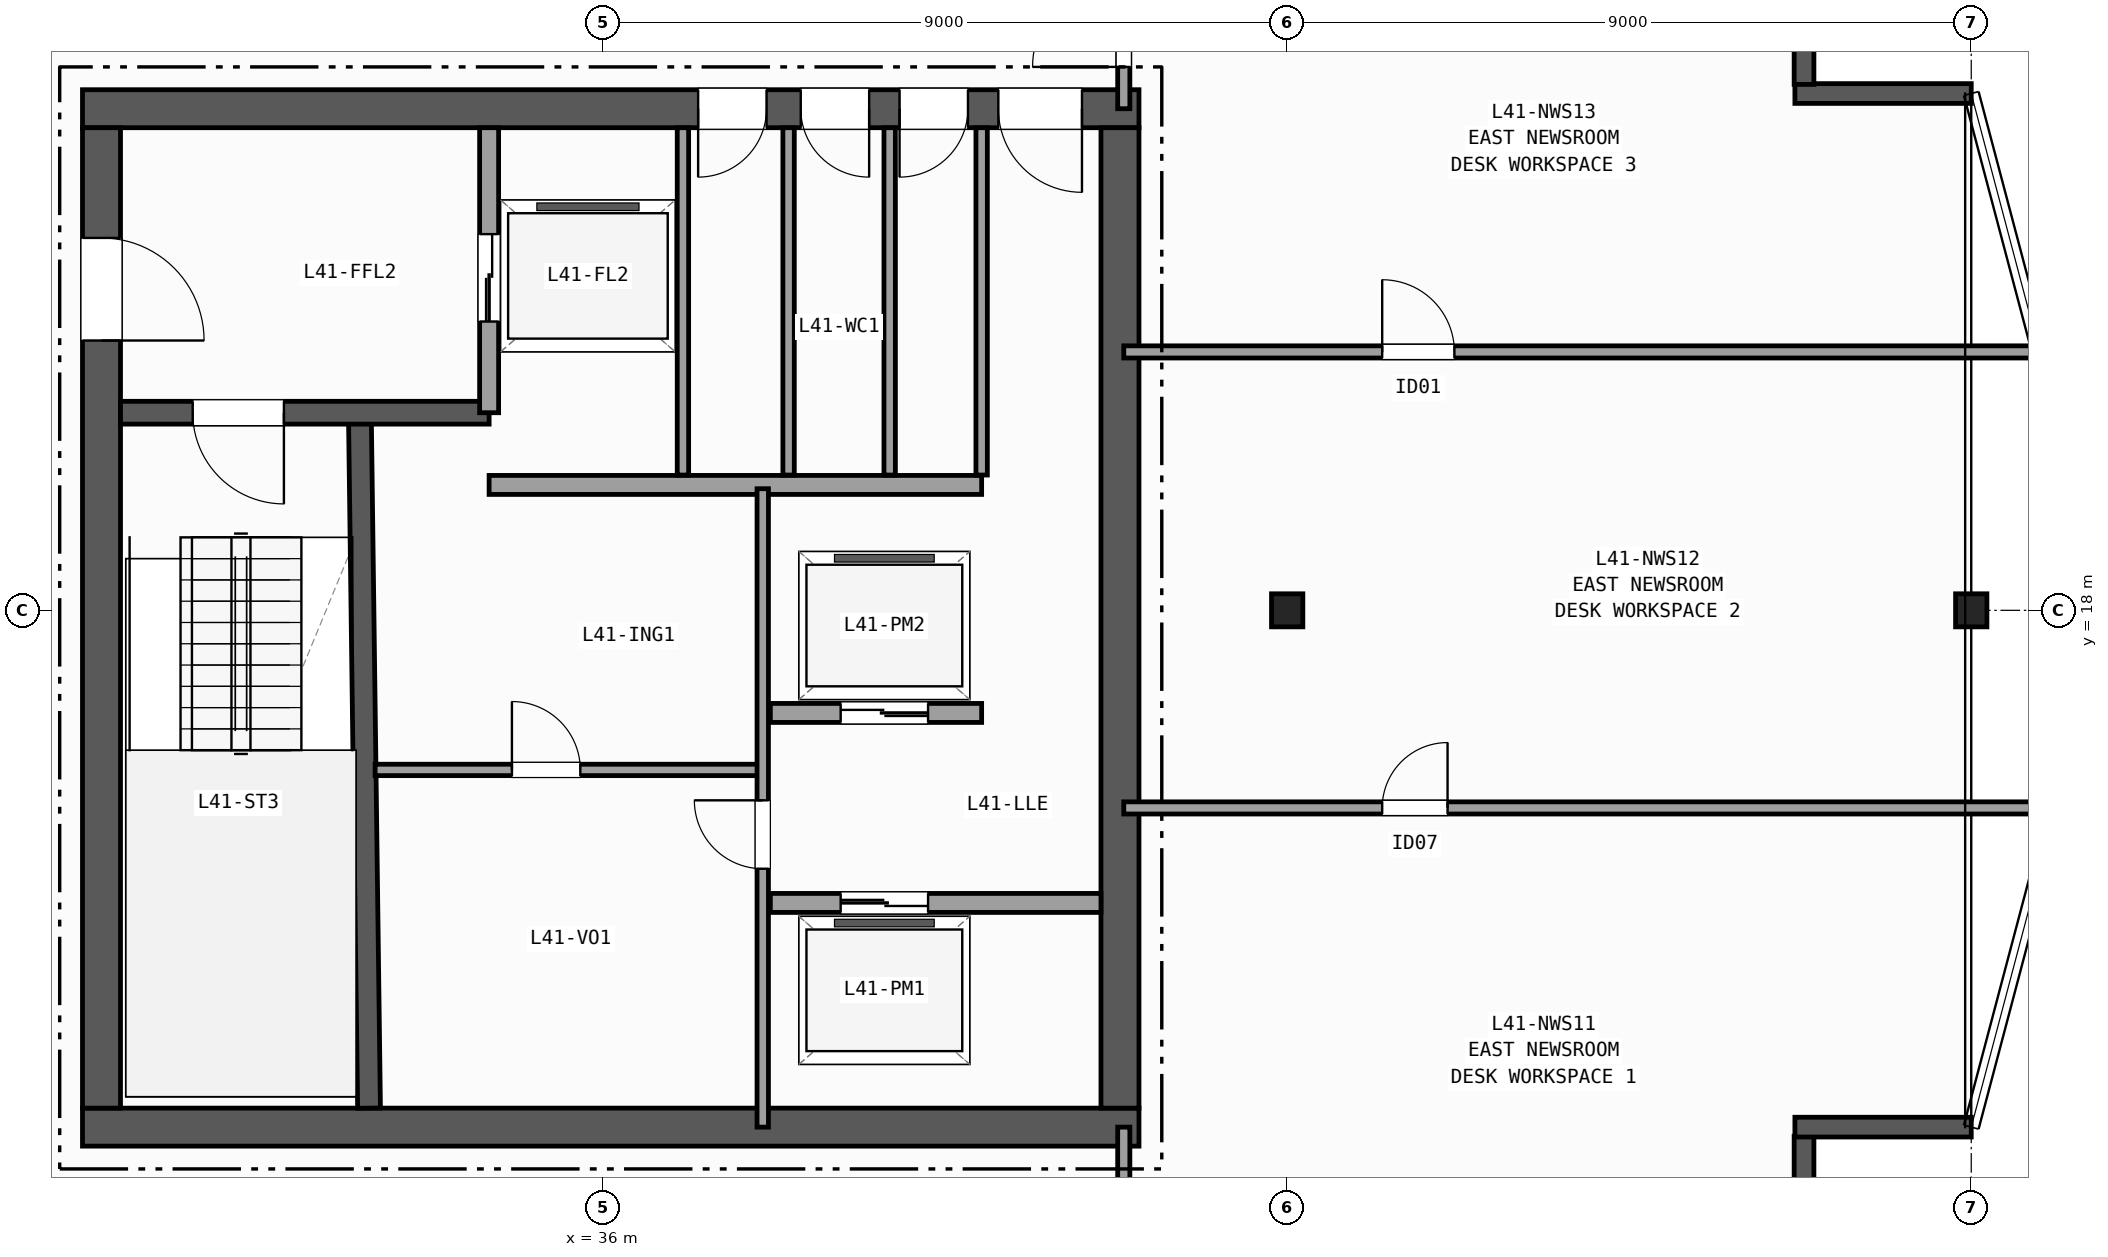
"""IFC4 building model, lengths in metres.
Left out: names, types, materials, properties, quantities, classifications, styles, units other than length and angle.
Written with IfcOpenShell. Run it as: python <this file> out.ifc"""

import sys

from ifc_helpers import new_model, si_unit, direction, frame, frame_2d, origin, origin_2d, place, context, subcontext, project, spatial, rectangle, i_section, extrude, element, fill, save


model = new_model("IFC4")
c1 = context("Model", 3, precision=1e-05, world=origin(), true_north=direction((0.0, 1.0)))
c2 = subcontext(c1, "Body", "Model", "MODEL_VIEW")
j1 = project(units=[si_unit("LENGTHUNIT", "METRE"), si_unit("PLANEANGLEUNIT", "RADIAN")], contexts=[c1])
p1 = place(None, origin())
s1 = spatial("IfcSite", under=j1, at=p1, CompositionType="ELEMENT")
p2 = place(p1, origin())
s2 = spatial("IfcBuilding", under=s1, at=p2, CompositionType="ELEMENT")
p3 = place(p2, frame((0.0, 0.0, 165.5)))
s3 = spatial("IfcBuildingStorey", under=s2, at=p3, CompositionType="ELEMENT", Elevation=165.5)
for number, where, z_axis, x_axis in (
    (1, (45.0, 18.0, 0.0), (0.0, 0.0, 1.0), (1.0, 0.0, 0.0)),
    (2, (54.0, 18.0, 0.0), (0.0, 0.0, 1.0), (1.0, 0.0, 0.0)),
):
    element("IfcColumn", number, at=place(p3, frame(where, z_axis=z_axis, x_axis=x_axis)), inside=s3, PredefinedType="COLUMN", context=c2, shape_type="SweptSolid", body=[
        extrude(i_section(OverallWidth=0.412, OverallDepth=0.435, WebThickness=0.036, FlangeThickness=0.057, FilletRadius=0.015, at=origin_2d()), origin(), (0.0, 0.0, 1.0), 3.7),
    ])
p4 = place(p3, frame((51.8, 9.0, 0.0), z_axis=(0.0, 0.0, 1.0), x_axis=(0.0, 1.0, 0.0)))
e3 = element("IfcWall", 3, at=p4, inside=s3, PredefinedType="SOLIDWALL", context=c2, shape_type="SweptSolid", body=[
    extrude(rectangle(XDim=2.08, YDim=0.26, at=frame_2d((1.04, 0.0))), origin(), (0.0, 0.0, 1.0), 3.37),
])
for number, where, z_axis, x_axis in (
    (4, (51.68, 11.2, 0.0), (0.0, 0.0, 1.0), (1.0, 0.0, 0.0)),
    (5, (54.0, 24.8, 0.0), (0.0, 0.0, 1.0), (-1.0, 0.0, 0.0)),
):
    element("IfcWall", number, at=place(p3, frame(where, z_axis=z_axis, x_axis=x_axis)), inside=s3, PredefinedType="SOLIDWALL", context=c2, shape_type="SweptSolid", body=[
        extrude(rectangle(XDim=2.32, YDim=0.26, at=frame_2d((1.16, 0.0))), origin(), (0.0, 0.0, 1.0), 3.37),
    ])
p5 = place(p3, frame((51.8, 24.92, 0.0), z_axis=(0.0, 0.0, 1.0), x_axis=(0.0, 1.0, 0.0)))
e6 = element("IfcWall", 6, at=p5, inside=s3, PredefinedType="SOLIDWALL", context=c2, shape_type="SweptSolid", body=[
    extrude(rectangle(XDim=2.08, YDim=0.26, at=frame_2d((1.04, 0.0))), origin(), (0.0, 0.0, 1.0), 3.37),
])
p6 = place(p3, frame((29.15, 11.2, 0.0), z_axis=(0.0, 0.0, 1.0), x_axis=(1.0, 0.0, 0.0)))
e7 = element("IfcWall", 7, at=p6, inside=s3, PredefinedType="SHEAR", context=c2, shape_type="SweptSolid", body=[
    extrude(rectangle(XDim=13.9, YDim=0.5, at=frame_2d((6.95, 0.0))), origin(), (0.0, 0.0, 1.0), 3.37),
])
p7 = place(p3, frame((43.05, 24.6, 0.0), z_axis=(0.0, 0.0, 1.0), x_axis=(-1.0, 0.0, 0.0)))
e8 = element("IfcWall", 8, at=p7, inside=s3, PredefinedType="SHEAR", context=c2, shape_type="SweptSolid", body=[
    extrude(rectangle(XDim=13.9, YDim=0.5, at=frame_2d((6.95, 0.0))), origin(), (0.0, 0.0, 1.0), 3.37),
])
p8 = place(p7, frame((0.75, 0.0, 0.0)))
e9 = element("IfcOpeningElement", 9, at=p8, cuts=e8, PredefinedType="OPENING", context=c2, shape_type="SweptSolid", body=[
    extrude(rectangle(XDim=1.1, YDim=2.15, at=frame_2d((0.55, 1.075))), frame((0.0, 0.26, 0.0), z_axis=(0.0, -1.0, 0.0), x_axis=(1.0, 0.0, 0.0)), (0.0, 0.0, 1.0), 0.52),
])
p9 = place(p7, frame((2.25, 0.0, 0.0)))
e10 = element("IfcOpeningElement", 10, at=p9, cuts=e8, PredefinedType="OPENING", context=c2, shape_type="SweptSolid", body=[
    extrude(rectangle(XDim=0.9, YDim=2.1, at=frame_2d((0.45, 1.05))), frame((0.0, 0.26, 0.0), z_axis=(0.0, -1.0, 0.0), x_axis=(1.0, 0.0, 0.0)), (0.0, 0.0, 1.0), 0.52),
])
p10 = place(p7, frame((3.55, 0.0, 0.0)))
e11 = element("IfcOpeningElement", 11, at=p10, cuts=e8, PredefinedType="OPENING", context=c2, shape_type="SweptSolid", body=[
    extrude(rectangle(XDim=0.9, YDim=2.1, at=frame_2d((0.45, 1.05))), frame((0.0, 0.26, 0.0), z_axis=(0.0, -1.0, 0.0), x_axis=(1.0, 0.0, 0.0)), (0.0, 0.0, 1.0), 0.52),
])
p11 = place(p7, frame((4.9, 0.0, 0.0)))
e12 = element("IfcOpeningElement", 12, at=p11, cuts=e8, PredefinedType="OPENING", context=c2, shape_type="SweptSolid", body=[
    extrude(rectangle(XDim=0.9, YDim=2.1, at=frame_2d((0.45, 1.05))), frame((0.0, 0.26, 0.0), z_axis=(0.0, -1.0, 0.0), x_axis=(1.0, 0.0, 0.0)), (0.0, 0.0, 1.0), 0.52),
])
p12 = place(p3, frame((29.4, 24.35, 0.0), z_axis=(0.0, 0.0, 1.0), x_axis=(0.0, -1.0, 0.0)))
e13 = element("IfcWall", 13, at=p12, inside=s3, PredefinedType="SHEAR", context=c2, shape_type="SweptSolid", body=[
    extrude(rectangle(XDim=12.9, YDim=0.5, at=frame_2d((6.45, 0.0))), origin(), (0.0, 0.0, 1.0), 3.37),
])
p13 = place(p12, frame((1.45, 0.0, 0.0)))
e14 = element("IfcOpeningElement", 14, at=p13, cuts=e13, PredefinedType="OPENING", context=c2, shape_type="SweptSolid", body=[
    extrude(rectangle(XDim=1.35, YDim=2.15, at=frame_2d((0.675, 1.075))), frame((0.0, 0.26, 0.0), z_axis=(0.0, -1.0, 0.0), x_axis=(1.0, 0.0, 0.0)), (0.0, 0.0, 1.0), 0.52),
])
p14 = place(p3, frame((42.8, 11.45, 0.0), z_axis=(0.0, 0.0, 1.0), x_axis=(0.0, 1.0, 0.0)))
e15 = element("IfcWall", 15, at=p14, inside=s3, PredefinedType="SHEAR", context=c2, shape_type="SweptSolid", body=[
    extrude(rectangle(XDim=12.9, YDim=0.5, at=frame_2d((6.45, 0.0))), origin(), (0.0, 0.0, 1.0), 3.37),
])
p15 = place(p3, frame((32.92, 11.45, 0.0), z_axis=(0.0, 0.0, 1.0), x_axis=(-0.013171578211, 0.999913251001, 0.0)))
e16 = element("IfcWall", 16, at=p15, inside=s3, PredefinedType="SHEAR", context=c2, shape_type="SweptSolid", body=[
    extrude(rectangle(XDim=9.101, YDim=0.3, at=frame_2d((4.55, 0.0))), origin(), (0.0, 0.0, 1.0), 3.37),
])
p16 = place(p3, frame((34.5, 20.6, 0.0), z_axis=(0.0, 0.0, 1.0), x_axis=(-1.0, 0.0, 0.0)))
e17 = element("IfcWall", 17, at=p16, inside=s3, PredefinedType="SHEAR", context=c2, shape_type="SweptSolid", body=[
    extrude(rectangle(XDim=4.85, YDim=0.3, at=frame_2d((2.425, 0.0))), origin(), (0.0, 0.0, 1.0), 3.37),
])
p17 = place(p16, frame((2.7, 0.0, 0.0)))
e18 = element("IfcOpeningElement", 18, at=p17, cuts=e17, PredefinedType="OPENING", context=c2, shape_type="SweptSolid", body=[
    extrude(rectangle(XDim=1.2, YDim=2.15, at=frame_2d((0.6, 1.075))), frame((0.0, 0.16, 0.0), z_axis=(0.0, -1.0, 0.0), x_axis=(1.0, 0.0, 0.0)), (0.0, 0.0, 1.0), 0.32),
])
p18 = place(p3, frame((34.5, 20.6, 0.0), z_axis=(0.0, 0.0, 1.0), x_axis=(0.0, 1.0, 0.0)))
e19 = element("IfcWall", 19, at=p18, inside=s3, PredefinedType="PARTITIONING", context=c2, shape_type="SweptSolid", body=[
    extrude(rectangle(XDim=3.75, YDim=0.25, at=frame_2d((1.875, 0.0))), origin(), (0.0, 0.0, 1.0), 3.37),
])
p19 = place(p18, frame((1.2, 0.0, 0.0)))
e20 = element("IfcOpeningElement", 20, at=p19, cuts=e19, PredefinedType="OPENING", context=c2, shape_type="SweptSolid", body=[
    extrude(rectangle(XDim=1.15, YDim=2.15, at=frame_2d((0.575, 1.075))), frame((0.0, 0.135, 0.0), z_axis=(0.0, -1.0, 0.0), x_axis=(1.0, 0.0, 0.0)), (0.0, 0.0, 1.0), 0.27),
])
p20 = place(p3, frame((34.5, 19.65, 0.0), z_axis=(0.0, 0.0, 1.0), x_axis=(1.0, 0.0, 0.0)))
e21 = element("IfcWall", 21, at=p20, inside=s3, PredefinedType="PARTITIONING", context=c2, shape_type="SweptSolid", body=[
    extrude(rectangle(XDim=6.48, YDim=0.25, at=frame_2d((3.24, 0.0))), origin(), (0.0, 0.0, 1.0), 3.37),
])
p21 = place(p3, frame((38.2, 14.15, 0.0), z_axis=(0.0, 0.0, 1.0), x_axis=(1.0, 0.0, 0.0)))
e22 = element("IfcWall", 22, at=p21, inside=s3, PredefinedType="PARTITIONING", context=c2, shape_type="SweptSolid", body=[
    extrude(rectangle(XDim=4.35, YDim=0.25, at=frame_2d((2.175, 0.0))), origin(), (0.0, 0.0, 1.0), 3.37),
])
p22 = place(p21, frame((0.925, 0.0, 0.0)))
e23 = element("IfcOpeningElement", 23, at=p22, cuts=e22, PredefinedType="OPENING", context=c2, shape_type="SweptSolid", body=[
    extrude(rectangle(XDim=1.15, YDim=2.15, at=frame_2d((0.575, 1.075))), frame((0.0, 0.135, 0.0), z_axis=(0.0, -1.0, 0.0), x_axis=(1.0, 0.0, 0.0)), (0.0, 0.0, 1.0), 0.27),
])
p23 = place(p3, frame((40.98, 16.65, 0.0), z_axis=(0.0, 0.0, 1.0), x_axis=(-1.0, 0.0, 0.0)))
e24 = element("IfcWall", 24, at=p23, inside=s3, PredefinedType="PARTITIONING", context=c2, shape_type="SweptSolid", body=[
    extrude(rectangle(XDim=2.78, YDim=0.25, at=frame_2d((1.39, 0.0))), origin(), (0.0, 0.0, 1.0), 3.37),
])
p24 = place(p23, frame((0.705, 0.0, 0.0)))
e25 = element("IfcOpeningElement", 25, at=p24, cuts=e24, PredefinedType="OPENING", context=c2, shape_type="SweptSolid", body=[
    extrude(rectangle(XDim=1.15, YDim=2.15, at=frame_2d((0.575, 1.075))), frame((0.0, 0.135, 0.0), z_axis=(0.0, -1.0, 0.0), x_axis=(1.0, 0.0, 0.0)), (0.0, 0.0, 1.0), 0.27),
])
p25 = place(p3, frame((33.0, 15.9, 0.0), z_axis=(0.0, 0.0, 1.0), x_axis=(1.0, 0.0, 0.0)))
e26 = element("IfcWall", 26, at=p25, inside=s3, PredefinedType="PARTITIONING", context=c2, shape_type="SweptSolid", body=[
    extrude(rectangle(XDim=5.1, YDim=0.15, at=frame_2d((2.55, 0.0))), origin(), (0.0, 0.0, 1.0), 3.37),
])
p26 = place(p25, frame((1.8, 0.0, 0.0)))
e27 = element("IfcOpeningElement", 27, at=p26, cuts=e26, PredefinedType="OPENING", context=c2, shape_type="SweptSolid", body=[
    extrude(rectangle(XDim=0.9, YDim=2.1, at=frame_2d((0.45, 1.05))), frame((0.0, 0.085, 0.0), z_axis=(0.0, -1.0, 0.0), x_axis=(1.0, 0.0, 0.0)), (0.0, 0.0, 1.0), 0.17),
])
p27 = place(p3, frame((38.1, 11.2, 0.0), z_axis=(0.0, 0.0, 1.0), x_axis=(0.0, 1.0, 0.0)))
e28 = element("IfcWall", 28, at=p27, inside=s3, PredefinedType="PARTITIONING", context=c2, shape_type="SweptSolid", body=[
    extrude(rectangle(XDim=8.4, YDim=0.15, at=frame_2d((4.2, 0.0))), origin(), (0.0, 0.0, 1.0), 3.37),
])
p28 = place(p27, frame((3.4, 0.0, 0.0)))
e29 = element("IfcOpeningElement", 29, at=p28, cuts=e28, PredefinedType="OPENING", context=c2, shape_type="SweptSolid", body=[
    extrude(rectangle(XDim=0.9, YDim=2.1, at=frame_2d((0.45, 1.05))), frame((0.0, 0.085, 0.0), z_axis=(0.0, -1.0, 0.0), x_axis=(1.0, 0.0, 0.0)), (0.0, 0.0, 1.0), 0.17),
])
for number, where, z_axis, x_axis in (
    (30, (37.05, 19.78, 0.0), (0.0, 0.0, 1.0), (0.0, 1.0, 0.0)),
    (31, (38.44, 19.78, 0.0), (0.0, 0.0, 1.0), (0.0, 1.0, 0.0)),
    (32, (39.77, 19.78, 0.0), (0.0, 0.0, 1.0), (0.0, 1.0, 0.0)),
    (33, (40.98, 19.78, 0.0), (0.0, 0.0, 1.0), (0.0, 1.0, 0.0)),
):
    element("IfcWall", number, at=place(p3, frame(where, z_axis=z_axis, x_axis=x_axis)), inside=s3, PredefinedType="PARTITIONING", context=c2, shape_type="SweptSolid", body=[
        extrude(rectangle(XDim=4.57, YDim=0.15, at=frame_2d((2.285, 0.0))), origin(), (0.0, 0.0, 1.0), 3.37),
    ])
p29 = place(p3, frame((42.85, 9.0, 0.0), z_axis=(0.0, 0.0, 1.0), x_axis=(0.0, 1.0, 0.0)))
e34 = element("IfcWall", 34, at=p29, inside=s3, PredefinedType="PARTITIONING", context=c2, shape_type="SweptSolid", body=[
    extrude(rectangle(XDim=2.2, YDim=0.16, at=frame_2d((1.1, 0.0))), origin(), (0.0, 0.0, 1.0), 2.584),
])
p30 = place(p3, frame((42.85, 24.6, 0.0), z_axis=(0.0, 0.0, 1.0), x_axis=(0.0, 1.0, 0.0)))
e35 = element("IfcWall", 35, at=p30, inside=s3, PredefinedType="PARTITIONING", context=c2, shape_type="SweptSolid", body=[
    extrude(rectangle(XDim=2.4, YDim=0.16, at=frame_2d((1.2, 0.0))), origin(), (0.0, 0.0, 1.0), 2.584),
])
p31 = place(p30, frame((0.55, 0.0, 0.0)))
e36 = element("IfcOpeningElement", 36, at=p31, cuts=e35, PredefinedType="OPENING", context=c2, shape_type="SweptSolid", body=[
    extrude(rectangle(XDim=1.2, YDim=2.15, at=frame_2d((0.6, 1.075))), frame((0.0, 0.09, 0.0), z_axis=(0.0, -1.0, 0.0), x_axis=(1.0, 0.0, 0.0)), (0.0, 0.0, 1.0), 0.18),
])
p32 = place(p3, frame((42.85, 15.4, 0.0), z_axis=(0.0, 0.0, 1.0), x_axis=(1.0, 0.0, 0.0)))
e37 = element("IfcWall", 37, at=p32, inside=s3, PredefinedType="PARTITIONING", context=c2, shape_type="SweptSolid", body=[
    extrude(rectangle(XDim=12.262, YDim=0.16, at=frame_2d((6.131, 0.0))), origin(), (0.0, 0.0, 1.0), 2.742),
])
p33 = place(p32, frame((3.4, 0.0, 0.0)))
e38 = element("IfcOpeningElement", 38, at=p33, cuts=e37, PredefinedType="OPENING", context=c2, shape_type="SweptSolid", body=[
    extrude(rectangle(XDim=0.86, YDim=2.05, at=frame_2d((0.43, 1.025))), frame((0.0, 0.09, 0.0), z_axis=(0.0, -1.0, 0.0), x_axis=(1.0, 0.0, 0.0)), (0.0, 0.0, 1.0), 0.18),
])
p34 = place(p3, frame((42.85, 21.4, 0.0), z_axis=(0.0, 0.0, 1.0), x_axis=(1.0, 0.0, 0.0)))
e39 = element("IfcWall", 39, at=p34, inside=s3, PredefinedType="PARTITIONING", context=c2, shape_type="SweptSolid", body=[
    extrude(rectangle(XDim=12.05, YDim=0.16, at=frame_2d((6.025, 0.0))), origin(), (0.0, 0.0, 1.0), 2.742),
])
p35 = place(p34, frame((3.4, 0.0, 0.0)))
e40 = element("IfcOpeningElement", 40, at=p35, cuts=e39, PredefinedType="OPENING", context=c2, shape_type="SweptSolid", body=[
    extrude(rectangle(XDim=0.95, YDim=2.1, at=frame_2d((0.475, 1.05))), frame((0.0, 0.09, 0.0), z_axis=(0.0, -1.0, 0.0), x_axis=(1.0, 0.0, 0.0)), (0.0, 0.0, 1.0), 0.18),
])
p36 = place(p17, origin())
e41 = element("IfcDoor", 41, at=p36, inside=s3, OperationType="SINGLE_SWING_LEFT", PredefinedType="DOOR", context=c2, shape_type="SweptSolid", body=[
    extrude(rectangle(XDim=1.2, YDim=2.15, at=frame_2d((0.6, 1.075))), frame((0.0, 0.025, 0.0), z_axis=(0.0, -1.0, 0.0), x_axis=(1.0, 0.0, 0.0)), (0.0, 0.0, 1.0), 0.05),
])
fill(e18, e41)
p37 = place(p13, origin())
e42 = element("IfcDoor", 42, at=p37, inside=s3, OperationType="SINGLE_SWING_RIGHT", PredefinedType="DOOR", context=c2, shape_type="SweptSolid", body=[
    extrude(rectangle(XDim=1.35, YDim=2.15, at=frame_2d((0.675, 1.075))), frame((0.0, 0.025, 0.0), z_axis=(0.0, -1.0, 0.0), x_axis=(1.0, 0.0, 0.0)), (0.0, 0.0, 1.0), 0.05),
])
fill(e14, e42)
p38 = place(p8, origin())
e43 = element("IfcDoor", 43, at=p38, inside=s3, OperationType="SINGLE_SWING_LEFT", PredefinedType="DOOR", context=c2, shape_type="SweptSolid", body=[
    extrude(rectangle(XDim=1.1, YDim=2.15, at=frame_2d((0.55, 1.075))), frame((0.0, 0.025, 0.0), z_axis=(0.0, -1.0, 0.0), x_axis=(1.0, 0.0, 0.0)), (0.0, 0.0, 1.0), 0.05),
])
fill(e9, e43)
p39 = place(p9, origin())
e44 = element("IfcDoor", 44, at=p39, inside=s3, OperationType="SINGLE_SWING_RIGHT", PredefinedType="DOOR", context=c2, shape_type="SweptSolid", body=[
    extrude(rectangle(XDim=0.9, YDim=2.1, at=frame_2d((0.45, 1.05))), frame((0.0, 0.025, 0.0), z_axis=(0.0, -1.0, 0.0), x_axis=(1.0, 0.0, 0.0)), (0.0, 0.0, 1.0), 0.05),
])
fill(e10, e44)
p40 = place(p10, origin())
e45 = element("IfcDoor", 45, at=p40, inside=s3, OperationType="SINGLE_SWING_LEFT", PredefinedType="DOOR", context=c2, shape_type="SweptSolid", body=[
    extrude(rectangle(XDim=0.9, YDim=2.1, at=frame_2d((0.45, 1.05))), frame((0.0, 0.025, 0.0), z_axis=(0.0, -1.0, 0.0), x_axis=(1.0, 0.0, 0.0)), (0.0, 0.0, 1.0), 0.05),
])
fill(e11, e45)
p41 = place(p11, origin())
e46 = element("IfcDoor", 46, at=p41, inside=s3, OperationType="SINGLE_SWING_RIGHT", PredefinedType="DOOR", context=c2, shape_type="SweptSolid", body=[
    extrude(rectangle(XDim=0.9, YDim=2.1, at=frame_2d((0.45, 1.05))), frame((0.0, 0.025, 0.0), z_axis=(0.0, -1.0, 0.0), x_axis=(1.0, 0.0, 0.0)), (0.0, 0.0, 1.0), 0.05),
])
fill(e12, e46)
p42 = place(p19, origin())
e47 = element("IfcDoor", 47, at=p42, inside=s3, OperationType="DOUBLE_DOOR_SLIDING", PredefinedType="DOOR", context=c2, shape_type="SweptSolid", body=[
    extrude(rectangle(XDim=1.15, YDim=2.15, at=frame_2d((0.575, 1.075))), frame((0.0, 0.025, 0.0), z_axis=(0.0, -1.0, 0.0), x_axis=(1.0, 0.0, 0.0)), (0.0, 0.0, 1.0), 0.05),
])
fill(e20, e47)
p43 = place(p22, origin())
e48 = element("IfcDoor", 48, at=p43, inside=s3, OperationType="DOUBLE_DOOR_SLIDING", PredefinedType="DOOR", context=c2, shape_type="SweptSolid", body=[
    extrude(rectangle(XDim=1.15, YDim=2.15, at=frame_2d((0.575, 1.075))), frame((0.0, 0.025, 0.0), z_axis=(0.0, -1.0, 0.0), x_axis=(1.0, 0.0, 0.0)), (0.0, 0.0, 1.0), 0.05),
])
fill(e23, e48)
p44 = place(p24, origin())
e49 = element("IfcDoor", 49, at=p44, inside=s3, OperationType="DOUBLE_DOOR_SLIDING", PredefinedType="DOOR", context=c2, shape_type="SweptSolid", body=[
    extrude(rectangle(XDim=1.15, YDim=2.15, at=frame_2d((0.575, 1.075))), frame((0.0, 0.025, 0.0), z_axis=(0.0, -1.0, 0.0), x_axis=(1.0, 0.0, 0.0)), (0.0, 0.0, 1.0), 0.05),
])
fill(e25, e49)
p45 = place(p28, origin())
e50 = element("IfcDoor", 50, at=p45, inside=s3, OperationType="SINGLE_SWING_RIGHT", PredefinedType="DOOR", context=c2, shape_type="SweptSolid", body=[
    extrude(rectangle(XDim=0.9, YDim=2.1, at=frame_2d((0.45, 1.05))), frame((0.0, 0.025, 0.0), z_axis=(0.0, -1.0, 0.0), x_axis=(1.0, 0.0, 0.0)), (0.0, 0.0, 1.0), 0.05),
])
fill(e29, e50)
p46 = place(p26, origin())
e51 = element("IfcDoor", 51, at=p46, inside=s3, OperationType="SINGLE_SWING_LEFT", PredefinedType="DOOR", context=c2, shape_type="SweptSolid", body=[
    extrude(rectangle(XDim=0.9, YDim=2.1, at=frame_2d((0.45, 1.05))), frame((0.0, 0.025, 0.0), z_axis=(0.0, -1.0, 0.0), x_axis=(1.0, 0.0, 0.0)), (0.0, 0.0, 1.0), 0.05),
])
fill(e27, e51)
p47 = place(p31, origin())
e52 = element("IfcDoor", 52, at=p47, inside=s3, OperationType="SINGLE_SWING_LEFT", PredefinedType="DOOR", context=c2, shape_type="SweptSolid", body=[
    extrude(rectangle(XDim=1.2, YDim=2.15, at=frame_2d((0.6, 1.075))), frame((0.0, 0.025, 0.0), z_axis=(0.0, -1.0, 0.0), x_axis=(1.0, 0.0, 0.0)), (0.0, 0.0, 1.0), 0.05),
])
fill(e36, e52)
p48 = place(p33, origin())
e53 = element("IfcDoor", 53, at=p48, inside=s3, OperationType="SINGLE_SWING_RIGHT", PredefinedType="DOOR", context=c2, shape_type="SweptSolid", body=[
    extrude(rectangle(XDim=0.86, YDim=2.05, at=frame_2d((0.43, 1.025))), frame((0.0, 0.025, 0.0), z_axis=(0.0, -1.0, 0.0), x_axis=(1.0, 0.0, 0.0)), (0.0, 0.0, 1.0), 0.05),
])
fill(e38, e53)
p49 = place(p35, origin())
e54 = element("IfcDoor", 54, at=p49, inside=s3, OperationType="SINGLE_SWING_LEFT", PredefinedType="DOOR", context=c2, shape_type="SweptSolid", body=[
    extrude(rectangle(XDim=0.95, YDim=2.1, at=frame_2d((0.475, 1.05))), frame((0.0, 0.025, 0.0), z_axis=(0.0, -1.0, 0.0), x_axis=(1.0, 0.0, 0.0)), (0.0, 0.0, 1.0), 0.05),
])
fill(e40, e54)
save(model, sys.argv[1])
